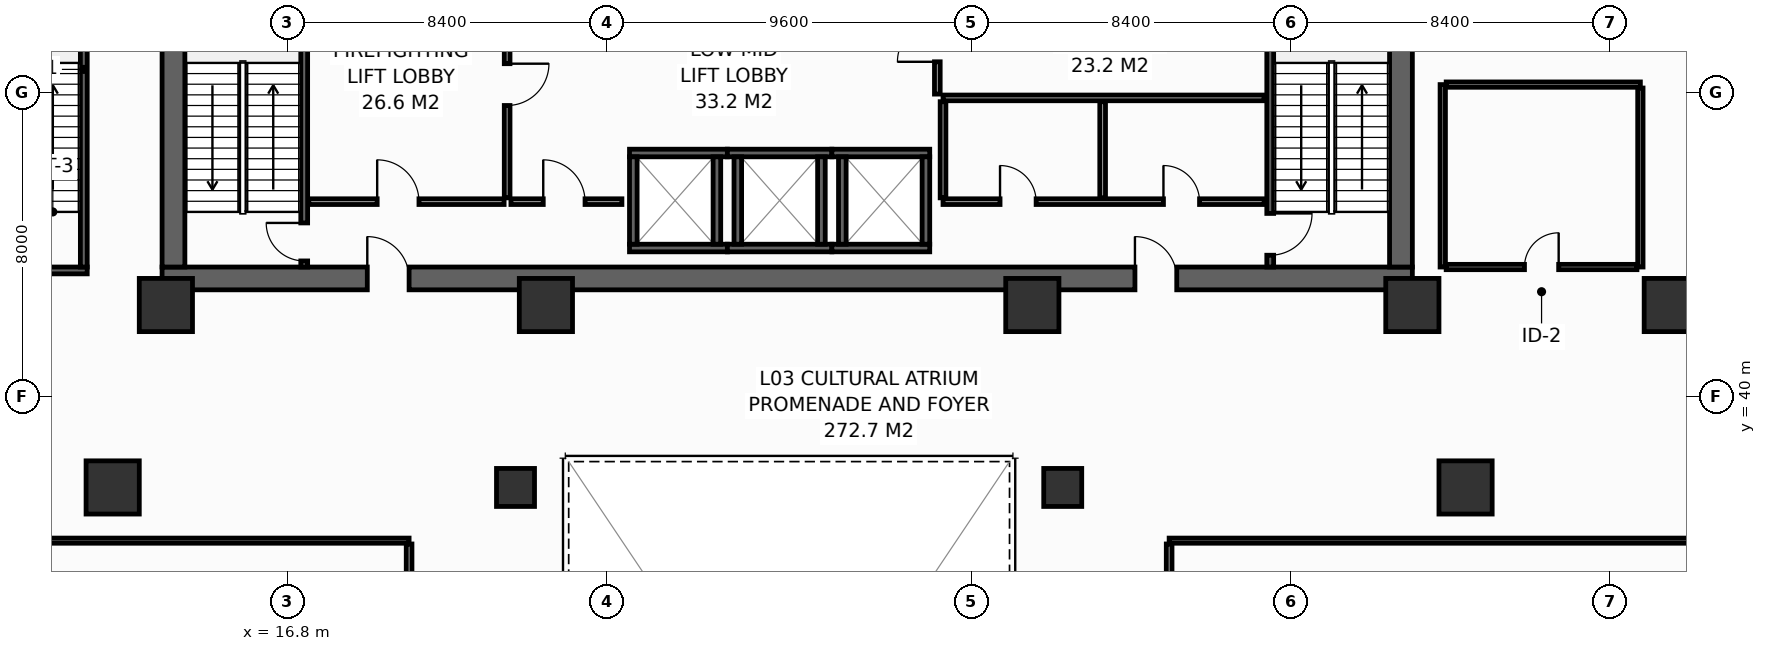
"""IFC4 building model, lengths in metres.
Left out: names, types, materials, properties, quantities, classifications, styles, units other than length and angle.
Written with IfcOpenShell. Run it as: python <this file> out.ifc"""

import sys

from ifc_helpers import new_model, si_unit, direction, frame, frame_2d, origin, origin_2d, place, context, subcontext, project, spatial, rectangle, hollow_rectangle, extrude, element, fill, save


model = new_model("IFC4")
c1 = context("Model", 3, precision=1e-05, world=origin(), true_north=direction((0.0, 1.0)))
c2 = subcontext(c1, "Body", "Model", "MODEL_VIEW")
j1 = project(units=[si_unit("LENGTHUNIT", "METRE"), si_unit("PLANEANGLEUNIT", "RADIAN")], contexts=[c1])
p1 = place(None, origin())
s1 = spatial("IfcSite", under=j1, at=p1, CompositionType="ELEMENT")
p2 = place(p1, origin())
s2 = spatial("IfcBuilding", under=s1, at=p2, CompositionType="ELEMENT")
p3 = place(p2, frame((0.0, 0.0, 16.8)))
s3 = spatial("IfcBuildingStorey", under=s2, at=p3, CompositionType="ELEMENT", Elevation=16.8)
p4 = place(p3, frame((13.5, 43.1, 0.0), z_axis=(0.0, 0.0, 1.0), x_axis=(1.0, 0.0, 0.0)))
e1 = element("IfcWall", 1, at=p4, inside=s3, PredefinedType="SHEAR", context=c2, shape_type="SweptSolid", body=[
    extrude(rectangle(XDim=32.9, YDim=0.6, at=frame_2d((16.45, 0.0))), origin(), (0.0, 0.0, 1.0), 5.1),
])
p5 = place(p4, frame((5.4, 0.0, 0.0)))
e2 = element("IfcOpeningElement", 2, at=p5, cuts=e1, PredefinedType="OPENING", context=c2, shape_type="SweptSolid", body=[
    extrude(rectangle(XDim=1.1, YDim=2.15, at=frame_2d((0.55, 1.075))), frame((0.0, 0.31, 0.0), z_axis=(0.0, -1.0, 0.0), x_axis=(1.0, 0.0, 0.0)), (0.0, 0.0, 1.0), 0.62),
])
p6 = place(p4, frame((25.6, 0.0, 0.0)))
e3 = element("IfcOpeningElement", 3, at=p6, cuts=e1, PredefinedType="OPENING", context=c2, shape_type="SweptSolid", body=[
    extrude(rectangle(XDim=1.1, YDim=2.15, at=frame_2d((0.55, 1.075))), frame((0.0, 0.31, 0.0), z_axis=(0.0, -1.0, 0.0), x_axis=(1.0, 0.0, 0.0)), (0.0, 0.0, 1.0), 0.62),
])
for number, where, z_axis, x_axis in (
    (4, (13.8, 43.4, 0.0), (0.0, 0.0, 1.0), (0.0, 1.0, 0.0)),
    (5, (46.1, 43.4, 0.0), (0.0, 0.0, 1.0), (0.0, 1.0, 0.0)),
):
    element("IfcWall", number, at=place(p3, frame(where, z_axis=z_axis, x_axis=x_axis)), inside=s3, PredefinedType="SHEAR", context=c2, shape_type="SweptSolid", body=[
        extrude(rectangle(XDim=10.4, YDim=0.6, at=frame_2d((5.2, 0.0))), origin(), (0.0, 0.0, 1.0), 5.1),
    ])
for number, where, z_axis, x_axis in (
    (6, (13.6, 42.4, 0.0), (0.0, 0.0, 1.0), (1.0, 0.0, 0.0)),
    (7, (23.6, 42.4, 0.0), (0.0, 0.0, 1.0), (1.0, 0.0, 0.0)),
    (8, (36.4, 42.4, 0.0), (0.0, 0.0, 1.0), (1.0, 0.0, 0.0)),
    (9, (46.4, 42.4, 0.0), (0.0, 0.0, 1.0), (1.0, 0.0, 0.0)),
    (10, (53.2, 42.4, 0.0), (0.0, 0.0, 1.0), (1.0, 0.0, 0.0)),
    (11, (12.2, 37.6, 0.0), (0.0, 0.0, 1.0), (1.0, 0.0, 0.0)),
):
    element("IfcColumn", number, at=place(p3, frame(where, z_axis=z_axis, x_axis=x_axis)), inside=s3, PredefinedType="COLUMN", context=c2, shape_type="SweptSolid", body=[
        extrude(hollow_rectangle(XDim=1.4, YDim=1.4, WallThickness=0.065, at=origin_2d()), origin(), (0.0, 0.0, 1.0), 5.4),
    ])
for number, where, z_axis, x_axis in (
    (12, (22.8, 37.6, 0.0), (0.0, 0.0, 1.0), (1.0, 0.0, 0.0)),
    (13, (37.2, 37.6, 0.0), (0.0, 0.0, 1.0), (1.0, 0.0, 0.0)),
):
    element("IfcColumn", number, at=place(p3, frame(where, z_axis=z_axis, x_axis=x_axis)), inside=s3, PredefinedType="COLUMN", context=c2, shape_type="SweptSolid", body=[
        extrude(hollow_rectangle(XDim=1.0, YDim=1.0, WallThickness=0.045, at=origin_2d()), origin(), (0.0, 0.0, 1.0), 5.4),
    ])
p7 = place(p3, frame((47.8, 37.6, 0.0), z_axis=(0.0, 0.0, 1.0), x_axis=(1.0, 0.0, 0.0)))
e14 = element("IfcColumn", 14, at=p7, inside=s3, PredefinedType="COLUMN", context=c2, shape_type="SweptSolid", body=[
    extrude(hollow_rectangle(XDim=1.4, YDim=1.4, WallThickness=0.065, at=origin_2d()), origin(), (0.0, 0.0, 1.0), 5.4),
])
for number, where, z_axis, x_axis in (
    (15, (25.8, 43.9, 0.0), (0.0, 0.0, 1.0), (1.0, 0.0, 0.0)),
    (16, (25.8, 46.4, 0.0), (0.0, 0.0, 1.0), (1.0, 0.0, 0.0)),
):
    element("IfcWall", number, at=place(p3, frame(where, z_axis=z_axis, x_axis=x_axis)), inside=s3, PredefinedType="SHEAR", context=c2, shape_type="SweptSolid", body=[
        extrude(rectangle(XDim=2.575, YDim=0.2, at=frame_2d((1.288, 0.0))), origin(), (0.0, 0.0, 1.0), 5.1),
    ])
for number, where, z_axis, x_axis in (
    (17, (25.9, 44.0, 0.0), (0.0, 0.0, 1.0), (0.0, 1.0, 0.0)),
    (18, (28.1, 44.0, 0.0), (0.0, 0.0, 1.0), (0.0, 1.0, 0.0)),
):
    element("IfcWall", number, at=place(p3, frame(where, z_axis=z_axis, x_axis=x_axis)), inside=s3, PredefinedType="SHEAR", context=c2, shape_type="SweptSolid", body=[
        extrude(rectangle(XDim=2.3, YDim=0.2, at=frame_2d((1.15, 0.0))), origin(), (0.0, 0.0, 1.0), 5.1),
    ])
for number, where, z_axis, x_axis in (
    (19, (28.375, 43.9, 0.0), (0.0, 0.0, 1.0), (1.0, 0.0, 0.0)),
    (20, (28.375, 46.4, 0.0), (0.0, 0.0, 1.0), (1.0, 0.0, 0.0)),
):
    element("IfcWall", number, at=place(p3, frame(where, z_axis=z_axis, x_axis=x_axis)), inside=s3, PredefinedType="SHEAR", context=c2, shape_type="SweptSolid", body=[
        extrude(rectangle(XDim=2.75, YDim=0.2, at=frame_2d((1.375, 0.0))), origin(), (0.0, 0.0, 1.0), 5.1),
    ])
for number, where, z_axis, x_axis in (
    (21, (28.65, 44.0, 0.0), (0.0, 0.0, 1.0), (0.0, 1.0, 0.0)),
    (22, (30.85, 44.0, 0.0), (0.0, 0.0, 1.0), (0.0, 1.0, 0.0)),
):
    element("IfcWall", number, at=place(p3, frame(where, z_axis=z_axis, x_axis=x_axis)), inside=s3, PredefinedType="SHEAR", context=c2, shape_type="SweptSolid", body=[
        extrude(rectangle(XDim=2.3, YDim=0.2, at=frame_2d((1.15, 0.0))), origin(), (0.0, 0.0, 1.0), 5.1),
    ])
for number, where, z_axis, x_axis in (
    (23, (31.125, 43.9, 0.0), (0.0, 0.0, 1.0), (1.0, 0.0, 0.0)),
    (24, (31.125, 46.4, 0.0), (0.0, 0.0, 1.0), (1.0, 0.0, 0.0)),
):
    element("IfcWall", number, at=place(p3, frame(where, z_axis=z_axis, x_axis=x_axis)), inside=s3, PredefinedType="SHEAR", context=c2, shape_type="SweptSolid", body=[
        extrude(rectangle(XDim=2.575, YDim=0.2, at=frame_2d((1.288, 0.0))), origin(), (0.0, 0.0, 1.0), 5.1),
    ])
for number, where, z_axis, x_axis in (
    (25, (31.4, 44.0, 0.0), (0.0, 0.0, 1.0), (0.0, 1.0, 0.0)),
    (26, (33.6, 44.0, 0.0), (0.0, 0.0, 1.0), (0.0, 1.0, 0.0)),
):
    element("IfcWall", number, at=place(p3, frame(where, z_axis=z_axis, x_axis=x_axis)), inside=s3, PredefinedType="SHEAR", context=c2, shape_type="SweptSolid", body=[
        extrude(rectangle(XDim=2.3, YDim=0.2, at=frame_2d((1.15, 0.0))), origin(), (0.0, 0.0, 1.0), 5.1),
    ])
p8 = place(p3, frame((17.24, 43.4, 0.0), z_axis=(0.0, 0.0, 1.0), x_axis=(0.0, 1.0, 0.0)))
e27 = element("IfcWall", 27, at=p8, inside=s3, PredefinedType="SHEAR", context=c2, shape_type="SweptSolid", body=[
    extrude(rectangle(XDim=10.4, YDim=0.18, at=frame_2d((5.2, 0.0))), origin(), (0.0, 0.0, 1.0), 5.1),
])
p9 = place(p8, frame((0.16, 0.0, 0.0)))
e28 = element("IfcOpeningElement", 28, at=p9, cuts=e27, PredefinedType="OPENING", context=c2, shape_type="SweptSolid", body=[
    extrude(rectangle(XDim=1.0, YDim=2.15, at=frame_2d((0.5, 1.075))), frame((0.0, 0.1, 0.0), z_axis=(0.0, -1.0, 0.0), x_axis=(1.0, 0.0, 0.0)), (0.0, 0.0, 1.0), 0.2),
])
p10 = place(p3, frame((42.66, 53.8, 0.0), z_axis=(0.0, 0.0, 1.0), x_axis=(0.0, -1.0, 0.0)))
e29 = element("IfcWall", 29, at=p10, inside=s3, PredefinedType="SHEAR", context=c2, shape_type="SweptSolid", body=[
    extrude(rectangle(XDim=10.4, YDim=0.18, at=frame_2d((5.2, 0.0))), origin(), (0.0, 0.0, 1.0), 5.1),
])
p11 = place(p10, frame((8.99, 0.0, 0.0)))
e30 = element("IfcOpeningElement", 30, at=p11, cuts=e29, PredefinedType="OPENING", context=c2, shape_type="SweptSolid", body=[
    extrude(rectangle(XDim=1.1, YDim=2.15, at=frame_2d((0.55, 1.075))), frame((0.0, 0.1, 0.0), z_axis=(0.0, -1.0, 0.0), x_axis=(1.0, 0.0, 0.0)), (0.0, 0.0, 1.0), 0.2),
])
p12 = place(p3, frame((8.12, 43.31, 0.0), z_axis=(0.0, 0.0, 1.0), x_axis=(1.0, 0.0, 0.0)))
e31 = element("IfcWall", 31, at=p12, inside=s3, PredefinedType="SHEAR", context=c2, shape_type="SweptSolid", body=[
    extrude(rectangle(XDim=3.41, YDim=0.18, at=frame_2d((1.705, 0.0))), origin(), (0.0, 0.0, 1.0), 5.1),
])
p13 = place(p12, frame((1.15, 0.0, 0.0)))
e32 = element("IfcOpeningElement", 32, at=p13, cuts=e31, PredefinedType="OPENING", context=c2, shape_type="SweptSolid", body=[
    extrude(rectangle(XDim=1.1, YDim=2.15, at=frame_2d((0.55, 1.075))), frame((0.0, 0.1, 0.0), z_axis=(0.0, -1.0, 0.0), x_axis=(1.0, 0.0, 0.0)), (0.0, 0.0, 1.0), 0.2),
])
p14 = place(p3, frame((11.44, 43.4, 0.0), z_axis=(0.0, 0.0, 1.0), x_axis=(0.0, 1.0, 0.0)))
e33 = element("IfcWall", 33, at=p14, inside=s3, PredefinedType="SHEAR", context=c2, shape_type="SweptSolid", body=[
    extrude(rectangle(XDim=10.4, YDim=0.18, at=frame_2d((5.2, 0.0))), origin(), (0.0, 0.0, 1.0), 5.1),
])
p15 = place(p3, frame((17.36, 45.12, 0.0), z_axis=(0.0, 0.0, 1.0), x_axis=(1.0, 0.0, 0.0)))
e34 = element("IfcWall", 34, at=p15, inside=s3, PredefinedType="PARTITIONING", context=c2, shape_type="SweptSolid", body=[
    extrude(rectangle(XDim=5.14, YDim=0.15, at=frame_2d((2.57, 0.0))), origin(), (0.0, 0.0, 1.0), 5.1),
])
p16 = place(p15, frame((1.8, 0.0, 0.0)))
e35 = element("IfcOpeningElement", 35, at=p16, cuts=e34, PredefinedType="OPENING", context=c2, shape_type="SweptSolid", body=[
    extrude(rectangle(XDim=1.1, YDim=2.15, at=frame_2d((0.55, 1.075))), frame((0.0, 0.085, 0.0), z_axis=(0.0, -1.0, 0.0), x_axis=(1.0, 0.0, 0.0)), (0.0, 0.0, 1.0), 0.17),
])
p17 = place(p3, frame((22.58, 50.55, 0.0), z_axis=(0.0, 0.0, 1.0), x_axis=(0.0, -1.0, 0.0)))
e36 = element("IfcWall", 36, at=p17, inside=s3, PredefinedType="PARTITIONING", context=c2, shape_type="SweptSolid", body=[
    extrude(rectangle(XDim=5.33, YDim=0.15, at=frame_2d((2.665, 0.0))), origin(), (0.0, 0.0, 1.0), 5.1),
])
p18 = place(p17, frame((1.8, 0.0, 0.0)))
e37 = element("IfcOpeningElement", 37, at=p18, cuts=e36, PredefinedType="OPENING", context=c2, shape_type="SweptSolid", body=[
    extrude(rectangle(XDim=1.1, YDim=2.15, at=frame_2d((0.55, 1.075))), frame((0.0, 0.085, 0.0), z_axis=(0.0, -1.0, 0.0), x_axis=(1.0, 0.0, 0.0)), (0.0, 0.0, 1.0), 0.17),
])
p19 = place(p3, frame((22.68, 45.12, 0.0), z_axis=(0.0, 0.0, 1.0), x_axis=(1.0, 0.0, 0.0)))
e38 = element("IfcWall", 38, at=p19, inside=s3, PredefinedType="PARTITIONING", context=c2, shape_type="SweptSolid", body=[
    extrude(rectangle(XDim=2.92, YDim=0.15, at=frame_2d((1.46, 0.0))), origin(), (0.0, 0.0, 1.0), 5.1),
])
p20 = place(p19, frame((0.85, 0.0, 0.0)))
e39 = element("IfcOpeningElement", 39, at=p20, cuts=e38, PredefinedType="OPENING", context=c2, shape_type="SweptSolid", body=[
    extrude(rectangle(XDim=1.1, YDim=2.15, at=frame_2d((0.55, 1.075))), frame((0.0, 0.085, 0.0), z_axis=(0.0, -1.0, 0.0), x_axis=(1.0, 0.0, 0.0)), (0.0, 0.0, 1.0), 0.17),
])
p21 = place(p3, frame((33.9, 47.95, 0.0), z_axis=(0.0, 0.0, 1.0), x_axis=(0.0, 1.0, 0.0)))
e40 = element("IfcWall", 40, at=p21, inside=s3, PredefinedType="PARTITIONING", context=c2, shape_type="SweptSolid", body=[
    extrude(rectangle(XDim=2.75, YDim=0.15, at=frame_2d((1.375, 0.0))), origin(), (0.0, 0.0, 1.0), 5.1),
])
p22 = place(p21, frame((0.85, 0.0, 0.0)))
e41 = element("IfcOpeningElement", 41, at=p22, cuts=e40, PredefinedType="OPENING", context=c2, shape_type="SweptSolid", body=[
    extrude(rectangle(XDim=1.05, YDim=2.15, at=frame_2d((0.525, 1.075))), frame((0.0, 0.085, 0.0), z_axis=(0.0, -1.0, 0.0), x_axis=(1.0, 0.0, 0.0)), (0.0, 0.0, 1.0), 0.17),
])
p23 = place(p3, frame((34.05, 45.12, 0.0), z_axis=(0.0, 0.0, 1.0), x_axis=(1.0, 0.0, 0.0)))
e42 = element("IfcWall", 42, at=p23, inside=s3, PredefinedType="PARTITIONING", context=c2, shape_type="SweptSolid", body=[
    extrude(rectangle(XDim=8.45, YDim=0.15, at=frame_2d((4.225, 0.0))), origin(), (0.0, 0.0, 1.0), 5.1),
])
p24 = place(p23, frame((1.5, 0.0, 0.0)))
e43 = element("IfcOpeningElement", 43, at=p24, cuts=e42, PredefinedType="OPENING", context=c2, shape_type="SweptSolid", body=[
    extrude(rectangle(XDim=0.95, YDim=2.15, at=frame_2d((0.475, 1.075))), frame((0.0, 0.085, 0.0), z_axis=(0.0, -1.0, 0.0), x_axis=(1.0, 0.0, 0.0)), (0.0, 0.0, 1.0), 0.17),
])
p25 = place(p23, frame((5.8, 0.0, 0.0)))
e44 = element("IfcOpeningElement", 44, at=p25, cuts=e42, PredefinedType="OPENING", context=c2, shape_type="SweptSolid", body=[
    extrude(rectangle(XDim=0.95, YDim=2.15, at=frame_2d((0.475, 1.075))), frame((0.0, 0.085, 0.0), z_axis=(0.0, -1.0, 0.0), x_axis=(1.0, 0.0, 0.0)), (0.0, 0.0, 1.0), 0.17),
])
p26 = place(p3, frame((34.05, 47.85, 0.0), z_axis=(0.0, 0.0, 1.0), x_axis=(1.0, 0.0, 0.0)))
e45 = element("IfcWall", 45, at=p26, inside=s3, PredefinedType="PARTITIONING", context=c2, shape_type="SweptSolid", body=[
    extrude(rectangle(XDim=8.45, YDim=0.15, at=frame_2d((4.225, 0.0))), origin(), (0.0, 0.0, 1.0), 5.1),
])
for number, where, z_axis, x_axis in (
    (46, (38.25, 45.22, 0.0), (0.0, 0.0, 1.0), (0.0, 1.0, 0.0)),
    (47, (34.05, 45.22, 0.0), (0.0, 0.0, 1.0), (0.0, 1.0, 0.0)),
):
    element("IfcWall", number, at=place(p3, frame(where, z_axis=z_axis, x_axis=x_axis)), inside=s3, PredefinedType="PARTITIONING", context=c2, shape_type="SweptSolid", body=[
        extrude(rectangle(XDim=2.53, YDim=0.15, at=frame_2d((1.265, 0.0))), origin(), (0.0, 0.0, 1.0), 5.1),
    ])
p27 = place(p3, frame((2.295, 36.2, 0.0), z_axis=(0.0, 0.0, 1.0), x_axis=(1.0, 0.0, 0.0)))
e48 = element("IfcWall", 48, at=p27, inside=s3, PredefinedType="PARTITIONING", context=c2, shape_type="SweptSolid", body=[
    extrude(rectangle(XDim=17.705, YDim=0.135, at=frame_2d((8.853, 0.0))), origin(), (0.0, 0.0, 1.0), 4.185),
])
p28 = place(p3, frame((20.0, 25.688, 0.0), z_axis=(0.0, 0.0, 1.0), x_axis=(0.0, 1.0, 0.0)))
e49 = element("IfcWall", 49, at=p28, inside=s3, PredefinedType="PARTITIONING", context=c2, shape_type="SweptSolid", body=[
    extrude(rectangle(XDim=10.425, YDim=0.15, at=frame_2d((5.212, 0.0))), origin(), (0.0, 0.0, 1.0), 4.185),
])
p29 = place(p28, frame((4.687, 0.0, 0.0)))
e50 = element("IfcOpeningElement", 50, at=p29, cuts=e49, PredefinedType="OPENING", context=c2, shape_type="SweptSolid", body=[
    extrude(rectangle(XDim=1.05, YDim=2.15, at=frame_2d((0.525, 1.075))), frame((0.0, 0.085, 0.0), z_axis=(0.0, -1.0, 0.0), x_axis=(1.0, 0.0, 0.0)), (0.0, 0.0, 1.0), 0.17),
])
p30 = place(p3, frame((40.0, 36.2, 0.0), z_axis=(0.0, 0.0, 1.0), x_axis=(1.0, 0.0, 0.0)))
e51 = element("IfcWall", 51, at=p30, inside=s3, PredefinedType="PARTITIONING", context=c2, shape_type="SweptSolid", body=[
    extrude(rectangle(XDim=17.705, YDim=0.135, at=frame_2d((8.853, 0.0))), origin(), (0.0, 0.0, 1.0), 4.185),
])
p31 = place(p3, frame((40.0, 24.887, 0.0), z_axis=(0.0, 0.0, 1.0), x_axis=(0.0, 1.0, 0.0)))
e52 = element("IfcWall", 52, at=p31, inside=s3, PredefinedType="PARTITIONING", context=c2, shape_type="SweptSolid", body=[
    extrude(rectangle(XDim=11.225, YDim=0.15, at=frame_2d((5.613, 0.0))), origin(), (0.0, 0.0, 1.0), 4.185),
])
p32 = place(p31, frame((5.087, 0.0, 0.0)))
e53 = element("IfcOpeningElement", 53, at=p32, cuts=e52, PredefinedType="OPENING", context=c2, shape_type="SweptSolid", body=[
    extrude(rectangle(XDim=1.05, YDim=2.15, at=frame_2d((0.525, 1.075))), frame((0.0, 0.085, 0.0), z_axis=(0.0, -1.0, 0.0), x_axis=(1.0, 0.0, 0.0)), (0.0, 0.0, 1.0), 0.17),
])
p33 = place(p3, frame((47.2, 43.4, 0.0), z_axis=(0.0, 0.0, 1.0), x_axis=(0.0, 1.0, 0.0)))
e54 = element("IfcWall", 54, at=p33, inside=s3, PredefinedType="PARTITIONING", context=c2, shape_type="SweptSolid", body=[
    extrude(rectangle(XDim=4.8, YDim=0.14, at=frame_2d((2.4, 0.0))), origin(), (0.0, 0.0, 1.0), 5.1),
])
p34 = place(p3, frame((47.29, 48.2, 0.0), z_axis=(0.0, 0.0, 1.0), x_axis=(1.0, 0.0, 0.0)))
e55 = element("IfcWall", 55, at=p34, inside=s3, PredefinedType="PARTITIONING", context=c2, shape_type="SweptSolid", body=[
    extrude(rectangle(XDim=5.11, YDim=0.14, at=frame_2d((2.555, 0.0))), origin(), (0.0, 0.0, 1.0), 5.1),
])
p35 = place(p3, frame((52.4, 43.4, 0.0), z_axis=(0.0, 0.0, 1.0), x_axis=(0.0, 1.0, 0.0)))
e56 = element("IfcWall", 56, at=p35, inside=s3, PredefinedType="PARTITIONING", context=c2, shape_type="SweptSolid", body=[
    extrude(rectangle(XDim=4.71, YDim=0.14, at=frame_2d((2.355, 0.0))), origin(), (0.0, 0.0, 1.0), 5.1),
])
p36 = place(p3, frame((47.29, 43.4, 0.0), z_axis=(0.0, 0.0, 1.0), x_axis=(1.0, 0.0, 0.0)))
e57 = element("IfcWall", 57, at=p36, inside=s3, PredefinedType="PARTITIONING", context=c2, shape_type="SweptSolid", body=[
    extrude(rectangle(XDim=5.02, YDim=0.14, at=frame_2d((2.51, 0.0))), origin(), (0.0, 0.0, 1.0), 5.1),
])
p37 = place(p36, frame((2.06, 0.0, 0.0)))
e58 = element("IfcOpeningElement", 58, at=p37, cuts=e57, PredefinedType="OPENING", context=c2, shape_type="SweptSolid", body=[
    extrude(rectangle(XDim=0.9, YDim=2.1, at=frame_2d((0.45, 1.05))), frame((0.0, 0.08, 0.0), z_axis=(0.0, -1.0, 0.0), x_axis=(1.0, 0.0, 0.0)), (0.0, 0.0, 1.0), 0.16),
])
p38 = place(p9, origin())
e59 = element("IfcDoor", 59, at=p38, inside=s3, OperationType="SINGLE_SWING_RIGHT", PredefinedType="DOOR", context=c2, shape_type="SweptSolid", body=[
    extrude(rectangle(XDim=1.0, YDim=2.15, at=frame_2d((0.5, 1.075))), frame((0.0, 0.025, 0.0), z_axis=(0.0, -1.0, 0.0), x_axis=(1.0, 0.0, 0.0)), (0.0, 0.0, 1.0), 0.05),
])
fill(e28, e59)
p39 = place(p11, origin())
e60 = element("IfcDoor", 60, at=p39, inside=s3, OperationType="SINGLE_SWING_LEFT", PredefinedType="DOOR", context=c2, shape_type="SweptSolid", body=[
    extrude(rectangle(XDim=1.1, YDim=2.15, at=frame_2d((0.55, 1.075))), frame((0.0, 0.025, 0.0), z_axis=(0.0, -1.0, 0.0), x_axis=(1.0, 0.0, 0.0)), (0.0, 0.0, 1.0), 0.05),
])
fill(e30, e60)
p40 = place(p16, origin())
e61 = element("IfcDoor", 61, at=p40, inside=s3, OperationType="SINGLE_SWING_LEFT", PredefinedType="DOOR", context=c2, shape_type="SweptSolid", body=[
    extrude(rectangle(XDim=1.1, YDim=2.15, at=frame_2d((0.55, 1.075))), frame((0.0, 0.025, 0.0), z_axis=(0.0, -1.0, 0.0), x_axis=(1.0, 0.0, 0.0)), (0.0, 0.0, 1.0), 0.05),
])
fill(e35, e61)
p41 = place(p18, origin())
e62 = element("IfcDoor", 62, at=p41, inside=s3, OperationType="SINGLE_SWING_LEFT", PredefinedType="DOOR", context=c2, shape_type="SweptSolid", body=[
    extrude(rectangle(XDim=1.1, YDim=2.15, at=frame_2d((0.55, 1.075))), frame((0.0, 0.025, 0.0), z_axis=(0.0, -1.0, 0.0), x_axis=(1.0, 0.0, 0.0)), (0.0, 0.0, 1.0), 0.05),
])
fill(e37, e62)
p42 = place(p20, origin())
e63 = element("IfcDoor", 63, at=p42, inside=s3, OperationType="SINGLE_SWING_LEFT", PredefinedType="DOOR", context=c2, shape_type="SweptSolid", body=[
    extrude(rectangle(XDim=1.1, YDim=2.15, at=frame_2d((0.55, 1.075))), frame((0.0, 0.025, 0.0), z_axis=(0.0, -1.0, 0.0), x_axis=(1.0, 0.0, 0.0)), (0.0, 0.0, 1.0), 0.05),
])
fill(e39, e63)
p43 = place(p5, origin())
e64 = element("IfcDoor", 64, at=p43, inside=s3, OperationType="SINGLE_SWING_LEFT", PredefinedType="DOOR", context=c2, shape_type="SweptSolid", body=[
    extrude(rectangle(XDim=1.1, YDim=2.15, at=frame_2d((0.55, 1.075))), frame((0.0, 0.025, 0.0), z_axis=(0.0, -1.0, 0.0), x_axis=(1.0, 0.0, 0.0)), (0.0, 0.0, 1.0), 0.05),
])
fill(e2, e64)
p44 = place(p6, origin())
e65 = element("IfcDoor", 65, at=p44, inside=s3, OperationType="SINGLE_SWING_LEFT", PredefinedType="DOOR", context=c2, shape_type="SweptSolid", body=[
    extrude(rectangle(XDim=1.1, YDim=2.15, at=frame_2d((0.55, 1.075))), frame((0.0, 0.025, 0.0), z_axis=(0.0, -1.0, 0.0), x_axis=(1.0, 0.0, 0.0)), (0.0, 0.0, 1.0), 0.05),
])
fill(e3, e65)
p45 = place(p22, origin())
e66 = element("IfcDoor", 66, at=p45, inside=s3, OperationType="SINGLE_SWING_LEFT", PredefinedType="DOOR", context=c2, shape_type="SweptSolid", body=[
    extrude(rectangle(XDim=1.05, YDim=2.15, at=frame_2d((0.525, 1.075))), frame((0.0, 0.025, 0.0), z_axis=(0.0, -1.0, 0.0), x_axis=(1.0, 0.0, 0.0)), (0.0, 0.0, 1.0), 0.05),
])
fill(e41, e66)
p46 = place(p24, origin())
e67 = element("IfcDoor", 67, at=p46, inside=s3, OperationType="SINGLE_SWING_LEFT", PredefinedType="DOOR", context=c2, shape_type="SweptSolid", body=[
    extrude(rectangle(XDim=0.95, YDim=2.15, at=frame_2d((0.475, 1.075))), frame((0.0, 0.025, 0.0), z_axis=(0.0, -1.0, 0.0), x_axis=(1.0, 0.0, 0.0)), (0.0, 0.0, 1.0), 0.05),
])
fill(e43, e67)
p47 = place(p25, origin())
e68 = element("IfcDoor", 68, at=p47, inside=s3, OperationType="SINGLE_SWING_LEFT", PredefinedType="DOOR", context=c2, shape_type="SweptSolid", body=[
    extrude(rectangle(XDim=0.95, YDim=2.15, at=frame_2d((0.475, 1.075))), frame((0.0, 0.025, 0.0), z_axis=(0.0, -1.0, 0.0), x_axis=(1.0, 0.0, 0.0)), (0.0, 0.0, 1.0), 0.05),
])
fill(e44, e68)
p48 = place(p37, origin())
e69 = element("IfcDoor", 69, at=p48, inside=s3, OperationType="SINGLE_SWING_RIGHT", PredefinedType="DOOR", context=c2, shape_type="SweptSolid", body=[
    extrude(rectangle(XDim=0.9, YDim=2.1, at=frame_2d((0.45, 1.05))), frame((0.0, 0.025, 0.0), z_axis=(0.0, -1.0, 0.0), x_axis=(1.0, 0.0, 0.0)), (0.0, 0.0, 1.0), 0.05),
])
fill(e58, e69)
save(model, sys.argv[1])
